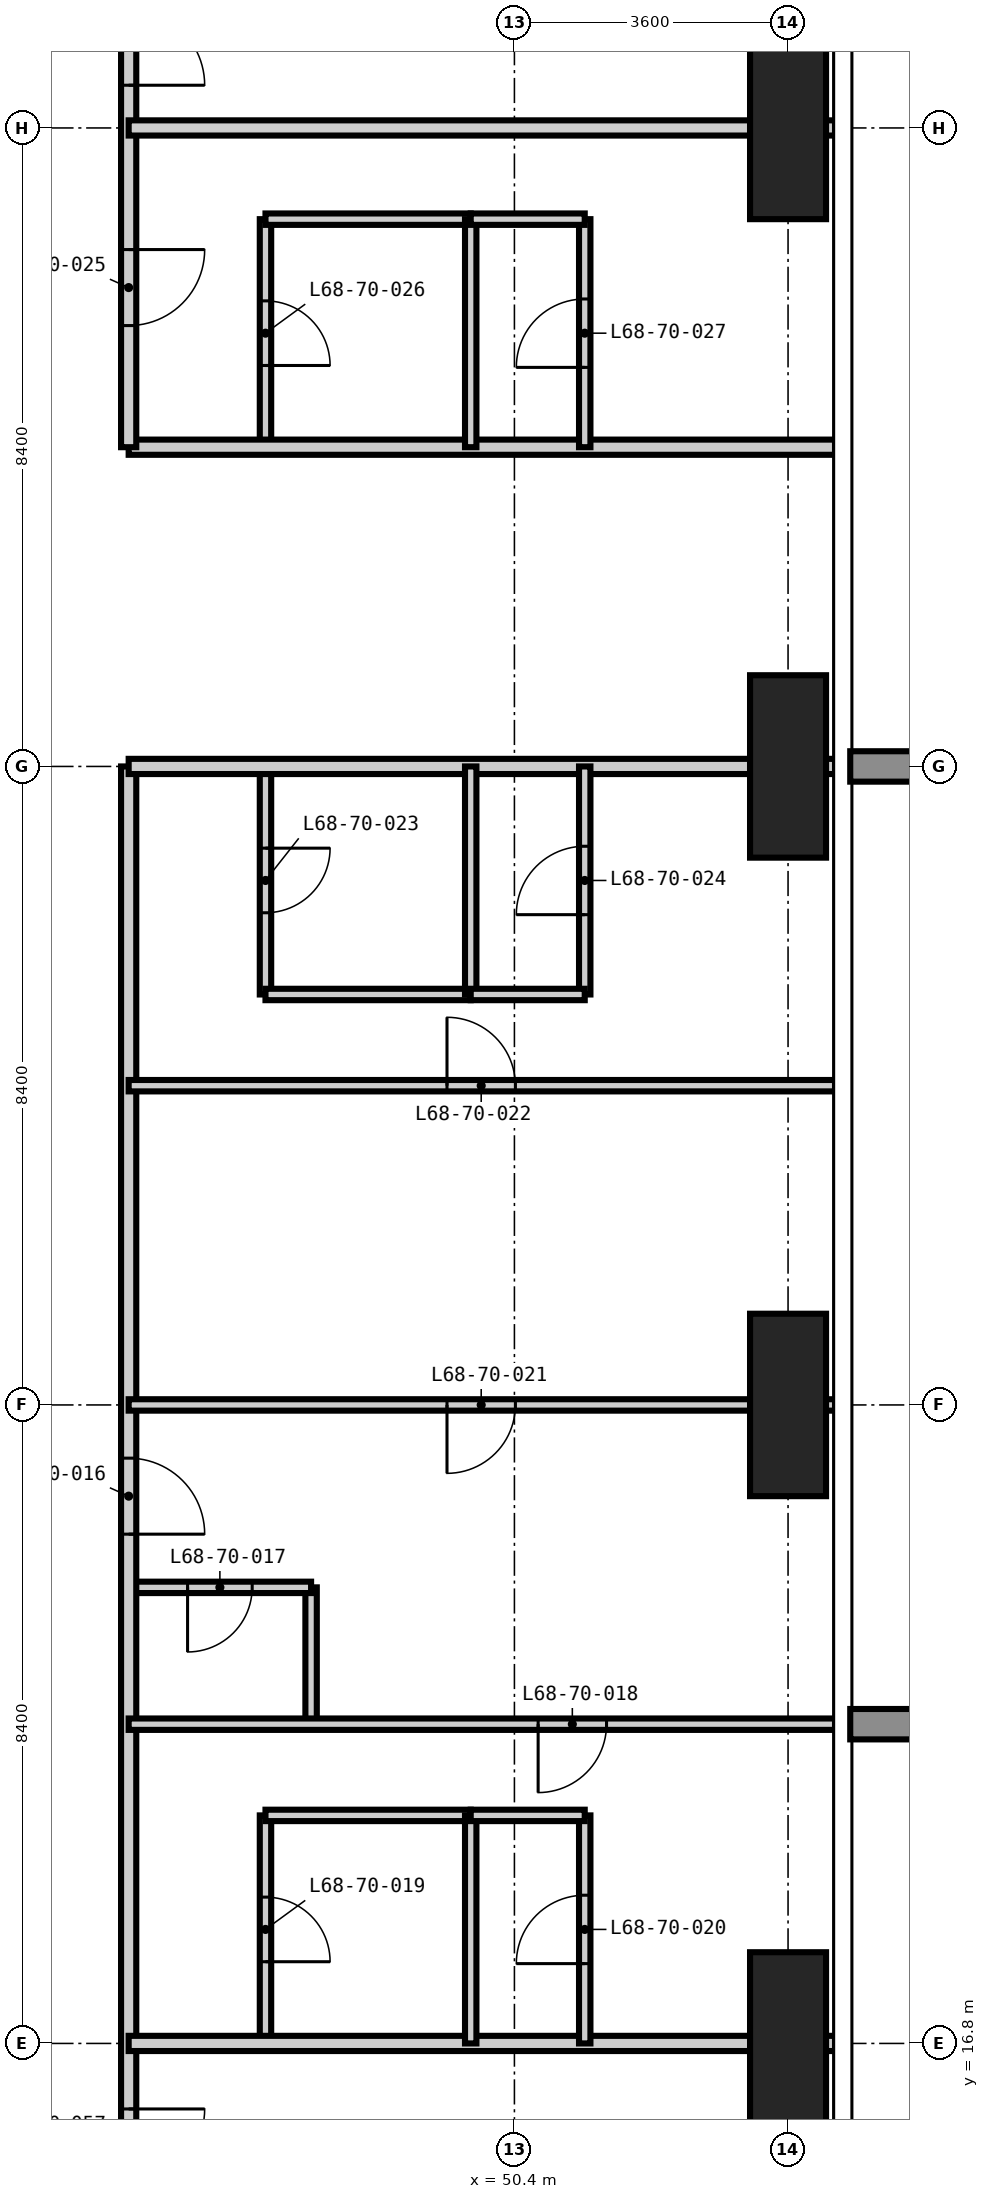
"""IFC4 building model, lengths in metres.
Left out: names, types, materials, properties, quantities, classifications, styles, units other than length and angle.
Written with IfcOpenShell. Run it as: python <this file> out.ifc"""

import sys

from ifc_helpers import new_model, si_unit, direction, frame, frame_2d, origin, origin_2d, place, context, subcontext, project, spatial, rectangle, extrude, element, fill, save


model = new_model("IFC4")
c1 = context("Model", 3, precision=1e-05, world=origin(), true_north=direction((0.0, 1.0)))
c2 = subcontext(c1, "Body", "Model", "MODEL_VIEW")
j1 = project(units=[si_unit("LENGTHUNIT", "METRE"), si_unit("PLANEANGLEUNIT", "RADIAN")], contexts=[c1])
p1 = place(None, origin())
s1 = spatial("IfcSite", under=j1, at=p1, CompositionType="ELEMENT")
p2 = place(p1, origin())
s2 = spatial("IfcBuilding", under=s1, at=p2, CompositionType="ELEMENT")
p3 = place(p2, frame((0.0, 0.0, 264.6)))
s3 = spatial("IfcBuildingStorey", under=s2, at=p3, CompositionType="ELEMENT", Elevation=264.6)
for number, where, z_axis, x_axis in (
    (1, (54.0, 16.8, -0.35), (0.0, 0.0, 1.0), (1.0, 0.0, 0.0)),
    (2, (54.0, 25.2, -0.35), (0.0, 0.0, 1.0), (1.0, 0.0, 0.0)),
    (3, (54.0, 33.6, -0.35), (0.0, 0.0, 1.0), (1.0, 0.0, 0.0)),
    (4, (54.0, 42.0, -0.35), (0.0, 0.0, 1.0), (1.0, 0.0, 0.0)),
):
    element("IfcColumn", number, at=place(p3, frame(where, z_axis=z_axis, x_axis=x_axis)), inside=s3, PredefinedType="COLUMN", context=c2, shape_type="SweptSolid", body=[
        extrude(rectangle(XDim=1.0, YDim=2.4, at=origin_2d()), origin(), (0.0, 0.0, 1.0), 3.9),
    ])
p4 = place(p3, frame((47.125, 16.8, 0.0), z_axis=(0.0, 0.0, 1.0), x_axis=(0.0, 1.0, 0.0)))
e5 = element("IfcWall", 5, at=p4, inside=s3, PredefinedType="PARTITIONING", context=c2, shape_type="SweptSolid", body=[
    extrude(rectangle(XDim=3.0, YDim=0.15, at=frame_2d((1.5, 0.0))), origin(), (0.0, 0.0, 1.0), 3.55),
])
p5 = place(p4, frame((1.075, 0.0, 0.0)))
e6 = element("IfcOpeningElement", 6, at=p5, cuts=e5, PredefinedType="OPENING", context=c2, shape_type="SweptSolid", body=[
    extrude(rectangle(XDim=0.85, YDim=2.1, at=frame_2d((0.425, 1.05))), frame((0.0, 0.085, 0.0), z_axis=(0.0, -1.0, 0.0), x_axis=(1.0, 0.0, 0.0)), (0.0, 0.0, 1.0), 0.17),
])
p6 = place(p3, frame((47.125, 30.6, 0.0), z_axis=(0.0, 0.0, 1.0), x_axis=(0.0, 1.0, 0.0)))
e7 = element("IfcWall", 7, at=p6, inside=s3, PredefinedType="PARTITIONING", context=c2, shape_type="SweptSolid", body=[
    extrude(rectangle(XDim=3.0, YDim=0.15, at=frame_2d((1.5, 0.0))), origin(), (0.0, 0.0, 1.0), 3.55),
])
p7 = place(p6, frame((1.075, 0.0, 0.0)))
e8 = element("IfcOpeningElement", 8, at=p7, cuts=e7, PredefinedType="OPENING", context=c2, shape_type="SweptSolid", body=[
    extrude(rectangle(XDim=0.85, YDim=2.1, at=frame_2d((0.425, 1.05))), frame((0.0, 0.085, 0.0), z_axis=(0.0, -1.0, 0.0), x_axis=(1.0, 0.0, 0.0)), (0.0, 0.0, 1.0), 0.17),
])
p8 = place(p3, frame((47.125, 37.8, 0.0), z_axis=(0.0, 0.0, 1.0), x_axis=(0.0, 1.0, 0.0)))
e9 = element("IfcWall", 9, at=p8, inside=s3, PredefinedType="PARTITIONING", context=c2, shape_type="SweptSolid", body=[
    extrude(rectangle(XDim=3.0, YDim=0.15, at=frame_2d((1.5, 0.0))), origin(), (0.0, 0.0, 1.0), 3.55),
])
p9 = place(p8, frame((1.075, 0.0, 0.0)))
e10 = element("IfcOpeningElement", 10, at=p9, cuts=e9, PredefinedType="OPENING", context=c2, shape_type="SweptSolid", body=[
    extrude(rectangle(XDim=0.85, YDim=2.1, at=frame_2d((0.425, 1.05))), frame((0.0, 0.085, 0.0), z_axis=(0.0, -1.0, 0.0), x_axis=(1.0, 0.0, 0.0)), (0.0, 0.0, 1.0), 0.17),
])
p10 = place(p3, frame((47.725, 21.0, 0.0), z_axis=(0.0, 0.0, 1.0), x_axis=(0.0, 1.0, 0.0)))
e11 = element("IfcWall", 11, at=p10, inside=s3, PredefinedType="PARTITIONING", context=c2, shape_type="SweptSolid", body=[
    extrude(rectangle(XDim=1.8, YDim=0.15, at=frame_2d((0.9, 0.0))), origin(), (0.0, 0.0, 1.0), 3.55),
])
p11 = place(p3, frame((47.125, 19.8, 0.0), z_axis=(0.0, 0.0, 1.0), x_axis=(1.0, 0.0, 0.0)))
e12 = element("IfcWall", 12, at=p11, inside=s3, PredefinedType="PARTITIONING", context=c2, shape_type="SweptSolid", body=[
    extrude(rectangle(XDim=2.7, YDim=0.15, at=frame_2d((1.35, 0.0))), origin(), (0.0, 0.0, 1.0), 3.55),
])
p12 = place(p3, frame((45.325, 22.8, 0.0), z_axis=(0.0, 0.0, 1.0), x_axis=(1.0, 0.0, 0.0)))
e13 = element("IfcWall", 13, at=p12, inside=s3, PredefinedType="PARTITIONING", context=c2, shape_type="SweptSolid", body=[
    extrude(rectangle(XDim=2.4, YDim=0.15, at=frame_2d((1.2, 0.0))), origin(), (0.0, 0.0, 1.0), 3.55),
])
p13 = place(p12, frame((0.775, 0.0, 0.0)))
e14 = element("IfcOpeningElement", 14, at=p13, cuts=e13, PredefinedType="OPENING", context=c2, shape_type="SweptSolid", body=[
    extrude(rectangle(XDim=0.85, YDim=2.1, at=frame_2d((0.425, 1.05))), frame((0.0, 0.085, 0.0), z_axis=(0.0, -1.0, 0.0), x_axis=(1.0, 0.0, 0.0)), (0.0, 0.0, 1.0), 0.17),
])
for number, where, z_axis, x_axis in (
    (15, (47.125, 30.6, 0.0), (0.0, 0.0, 1.0), (1.0, 0.0, 0.0)),
    (16, (47.125, 40.8, 0.0), (0.0, 0.0, 1.0), (1.0, 0.0, 0.0)),
):
    element("IfcWall", number, at=place(p3, frame(where, z_axis=z_axis, x_axis=x_axis)), inside=s3, PredefinedType="PARTITIONING", context=c2, shape_type="SweptSolid", body=[
        extrude(rectangle(XDim=2.7, YDim=0.15, at=frame_2d((1.35, 0.0))), origin(), (0.0, 0.0, 1.0), 3.55),
    ])
p14 = place(p3, frame((45.325, 37.8, 0.0), z_axis=(0.0, 0.0, 1.0), x_axis=(1.0, 0.0, 0.0)))
e17 = element("IfcWall", 17, at=p14, inside=s3, PredefinedType="PARTITIONING", context=c2, shape_type="SweptSolid", body=[
    extrude(rectangle(XDim=9.293, YDim=0.2, at=frame_2d((4.646, 0.0))), origin(), (0.0, 0.0, 1.0), 3.55),
])
p15 = place(p3, frame((45.325, 33.6, 0.0), z_axis=(0.0, 0.0, 1.0), x_axis=(0.0, -1.0, 0.0)))
e18 = element("IfcWall", 18, at=p15, inside=s3, PredefinedType="PARTITIONING", context=c2, shape_type="SweptSolid", body=[
    extrude(rectangle(XDim=19.525, YDim=0.2, at=frame_2d((9.763, 0.0))), origin(), (0.0, 0.0, 1.0), 3.55),
])
p16 = place(p15, frame((9.1, 0.0, 0.0)))
e19 = element("IfcOpeningElement", 19, at=p16, cuts=e18, PredefinedType="OPENING", context=c2, shape_type="SweptSolid", body=[
    extrude(rectangle(XDim=1.0, YDim=2.2, at=frame_2d((0.5, 1.1))), frame((0.0, 0.11, 0.0), z_axis=(0.0, -1.0, 0.0), x_axis=(1.0, 0.0, 0.0)), (0.0, 0.0, 1.0), 0.22),
])
p17 = place(p15, frame((17.662, 0.0, 0.0)))
e20 = element("IfcOpeningElement", 20, at=p17, cuts=e18, PredefinedType="OPENING", context=c2, shape_type="SweptSolid", body=[
    extrude(rectangle(XDim=1.0, YDim=2.2, at=frame_2d((0.5, 1.1))), frame((0.0, 0.11, 0.0), z_axis=(0.0, -1.0, 0.0), x_axis=(1.0, 0.0, 0.0)), (0.0, 0.0, 1.0), 0.22),
])
p18 = place(p3, frame((45.325, 44.125, 0.0), z_axis=(0.0, 0.0, 1.0), x_axis=(0.0, -1.0, 0.0)))
e21 = element("IfcWall", 21, at=p18, inside=s3, PredefinedType="PARTITIONING", context=c2, shape_type="SweptSolid", body=[
    extrude(rectangle(XDim=6.325, YDim=0.2, at=frame_2d((3.163, 0.0))), origin(), (0.0, 0.0, 1.0), 3.55),
])
p19 = place(p18, frame((3.725, 0.0, 0.0)))
e22 = element("IfcOpeningElement", 22, at=p19, cuts=e21, PredefinedType="OPENING", context=c2, shape_type="SweptSolid", body=[
    extrude(rectangle(XDim=1.0, YDim=2.2, at=frame_2d((0.5, 1.1))), frame((0.0, 0.11, 0.0), z_axis=(0.0, -1.0, 0.0), x_axis=(1.0, 0.0, 0.0)), (0.0, 0.0, 1.0), 0.22),
])
p20 = place(p18, frame((0.563, 0.0, 0.0)))
e23 = element("IfcOpeningElement", 23, at=p20, cuts=e21, PredefinedType="OPENING", context=c2, shape_type="SweptSolid", body=[
    extrude(rectangle(XDim=1.0, YDim=2.2, at=frame_2d((0.5, 1.1))), frame((0.0, 0.11, 0.0), z_axis=(0.0, -1.0, 0.0), x_axis=(1.0, 0.0, 0.0)), (0.0, 0.0, 1.0), 0.22),
])
for number, where, z_axis, x_axis in (
    (24, (54.618, 33.6, 0.0), (0.0, 0.0, 1.0), (-1.0, 0.0, 0.0)),
    (25, (45.325, 16.8, 0.0), (0.0, 0.0, 1.0), (1.0, 0.0, 0.0)),
    (26, (45.325, 42.0, 0.0), (0.0, 0.0, 1.0), (1.0, 0.0, 0.0)),
):
    element("IfcWall", number, at=place(p3, frame(where, z_axis=z_axis, x_axis=x_axis)), inside=s3, PredefinedType="PARTITIONING", context=c2, shape_type="SweptSolid", body=[
        extrude(rectangle(XDim=9.293, YDim=0.2, at=frame_2d((4.646, 0.0))), origin(), (0.0, 0.0, 1.0), 3.55),
    ])
for number, where, z_axis, x_axis in (
    (27, (49.825, 16.8, 0.0), (0.0, 0.0, 1.0), (0.0, 1.0, 0.0)),
    (28, (49.825, 30.6, 0.0), (0.0, 0.0, 1.0), (0.0, 1.0, 0.0)),
    (29, (49.825, 37.8, 0.0), (0.0, 0.0, 1.0), (0.0, 1.0, 0.0)),
):
    element("IfcWall", number, at=place(p3, frame(where, z_axis=z_axis, x_axis=x_axis)), inside=s3, PredefinedType="PARTITIONING", context=c2, shape_type="SweptSolid", body=[
        extrude(rectangle(XDim=3.0, YDim=0.15, at=frame_2d((1.5, 0.0))), origin(), (0.0, 0.0, 1.0), 3.55),
    ])
p21 = place(p3, frame((51.325, 16.8, 0.0), z_axis=(0.0, 0.0, 1.0), x_axis=(0.0, 1.0, 0.0)))
e30 = element("IfcWall", 30, at=p21, inside=s3, PredefinedType="PARTITIONING", context=c2, shape_type="SweptSolid", body=[
    extrude(rectangle(XDim=3.0, YDim=0.15, at=frame_2d((1.5, 0.0))), origin(), (0.0, 0.0, 1.0), 3.55),
])
p22 = place(p21, frame((1.05, 0.0, 0.0)))
e31 = element("IfcOpeningElement", 31, at=p22, cuts=e30, PredefinedType="OPENING", context=c2, shape_type="SweptSolid", body=[
    extrude(rectangle(XDim=0.9, YDim=2.1, at=frame_2d((0.45, 1.05))), frame((0.0, 0.085, 0.0), z_axis=(0.0, -1.0, 0.0), x_axis=(1.0, 0.0, 0.0)), (0.0, 0.0, 1.0), 0.17),
])
p23 = place(p3, frame((51.325, 30.6, 0.0), z_axis=(0.0, 0.0, 1.0), x_axis=(0.0, 1.0, 0.0)))
e32 = element("IfcWall", 32, at=p23, inside=s3, PredefinedType="PARTITIONING", context=c2, shape_type="SweptSolid", body=[
    extrude(rectangle(XDim=3.0, YDim=0.15, at=frame_2d((1.5, 0.0))), origin(), (0.0, 0.0, 1.0), 3.55),
])
p24 = place(p23, frame((1.05, 0.0, 0.0)))
e33 = element("IfcOpeningElement", 33, at=p24, cuts=e32, PredefinedType="OPENING", context=c2, shape_type="SweptSolid", body=[
    extrude(rectangle(XDim=0.9, YDim=2.1, at=frame_2d((0.45, 1.05))), frame((0.0, 0.085, 0.0), z_axis=(0.0, -1.0, 0.0), x_axis=(1.0, 0.0, 0.0)), (0.0, 0.0, 1.0), 0.17),
])
p25 = place(p3, frame((51.325, 37.8, 0.0), z_axis=(0.0, 0.0, 1.0), x_axis=(0.0, 1.0, 0.0)))
e34 = element("IfcWall", 34, at=p25, inside=s3, PredefinedType="PARTITIONING", context=c2, shape_type="SweptSolid", body=[
    extrude(rectangle(XDim=3.0, YDim=0.15, at=frame_2d((1.5, 0.0))), origin(), (0.0, 0.0, 1.0), 3.55),
])
p26 = place(p25, frame((1.05, 0.0, 0.0)))
e35 = element("IfcOpeningElement", 35, at=p26, cuts=e34, PredefinedType="OPENING", context=c2, shape_type="SweptSolid", body=[
    extrude(rectangle(XDim=0.9, YDim=2.1, at=frame_2d((0.45, 1.05))), frame((0.0, 0.085, 0.0), z_axis=(0.0, -1.0, 0.0), x_axis=(1.0, 0.0, 0.0)), (0.0, 0.0, 1.0), 0.17),
])
p27 = place(p3, frame((49.825, 19.8, 0.0), z_axis=(0.0, 0.0, 1.0), x_axis=(1.0, 0.0, 0.0)))
e36 = element("IfcWall", 36, at=p27, inside=s3, PredefinedType="PARTITIONING", context=c2, shape_type="SweptSolid", body=[
    extrude(rectangle(XDim=1.5, YDim=0.15, at=frame_2d((0.75, 0.0))), origin(), (0.0, 0.0, 1.0), 3.55),
])
p28 = place(p3, frame((45.325, 21.0, 0.0), z_axis=(0.0, 0.0, 1.0), x_axis=(1.0, 0.0, 0.0)))
e37 = element("IfcWall", 37, at=p28, inside=s3, PredefinedType="PARTITIONING", context=c2, shape_type="SweptSolid", body=[
    extrude(rectangle(XDim=9.293, YDim=0.15, at=frame_2d((4.646, 0.0))), origin(), (0.0, 0.0, 1.0), 3.55),
])
p29 = place(p28, frame((5.387, 0.0, 0.0)))
e38 = element("IfcOpeningElement", 38, at=p29, cuts=e37, PredefinedType="OPENING", context=c2, shape_type="SweptSolid", body=[
    extrude(rectangle(XDim=0.9, YDim=2.1, at=frame_2d((0.45, 1.05))), frame((0.0, 0.085, 0.0), z_axis=(0.0, -1.0, 0.0), x_axis=(1.0, 0.0, 0.0)), (0.0, 0.0, 1.0), 0.17),
])
p30 = place(p3, frame((45.325, 25.2, 0.0), z_axis=(0.0, 0.0, 1.0), x_axis=(1.0, 0.0, 0.0)))
e39 = element("IfcWall", 39, at=p30, inside=s3, PredefinedType="PARTITIONING", context=c2, shape_type="SweptSolid", body=[
    extrude(rectangle(XDim=9.293, YDim=0.15, at=frame_2d((4.646, 0.0))), origin(), (0.0, 0.0, 1.0), 3.55),
])
p31 = place(p30, frame((4.188, 0.0, 0.0)))
e40 = element("IfcOpeningElement", 40, at=p31, cuts=e39, PredefinedType="OPENING", context=c2, shape_type="SweptSolid", body=[
    extrude(rectangle(XDim=0.9, YDim=2.1, at=frame_2d((0.45, 1.05))), frame((0.0, 0.085, 0.0), z_axis=(0.0, -1.0, 0.0), x_axis=(1.0, 0.0, 0.0)), (0.0, 0.0, 1.0), 0.17),
])
p32 = place(p3, frame((45.325, 29.4, 0.0), z_axis=(0.0, 0.0, 1.0), x_axis=(1.0, 0.0, 0.0)))
e41 = element("IfcWall", 41, at=p32, inside=s3, PredefinedType="PARTITIONING", context=c2, shape_type="SweptSolid", body=[
    extrude(rectangle(XDim=9.293, YDim=0.15, at=frame_2d((4.646, 0.0))), origin(), (0.0, 0.0, 1.0), 3.55),
])
p33 = place(p32, frame((4.188, 0.0, 0.0)))
e42 = element("IfcOpeningElement", 42, at=p33, cuts=e41, PredefinedType="OPENING", context=c2, shape_type="SweptSolid", body=[
    extrude(rectangle(XDim=0.9, YDim=2.1, at=frame_2d((0.45, 1.05))), frame((0.0, 0.085, 0.0), z_axis=(0.0, -1.0, 0.0), x_axis=(1.0, 0.0, 0.0)), (0.0, 0.0, 1.0), 0.17),
])
for number, where, z_axis, x_axis in (
    (43, (49.825, 30.6, 0.0), (0.0, 0.0, 1.0), (1.0, 0.0, 0.0)),
    (44, (49.825, 40.8, 0.0), (0.0, 0.0, 1.0), (1.0, 0.0, 0.0)),
):
    element("IfcWall", number, at=place(p3, frame(where, z_axis=z_axis, x_axis=x_axis)), inside=s3, PredefinedType="PARTITIONING", context=c2, shape_type="SweptSolid", body=[
        extrude(rectangle(XDim=1.5, YDim=0.15, at=frame_2d((0.75, 0.0))), origin(), (0.0, 0.0, 1.0), 3.55),
    ])
p34 = place(p16, origin())
e45 = element("IfcDoor", 45, at=p34, inside=s3, OperationType="SINGLE_SWING_RIGHT", PredefinedType="DOOR", context=c2, shape_type="SweptSolid", body=[
    extrude(rectangle(XDim=1.0, YDim=2.2, at=frame_2d((0.5, 1.1))), frame((0.0, 0.025, 0.0), z_axis=(0.0, -1.0, 0.0), x_axis=(1.0, 0.0, 0.0)), (0.0, 0.0, 1.0), 0.05),
])
fill(e19, e45)
p35 = place(p13, frame((0.85, 0.0, 0.0), z_axis=(0.0, 0.0, 1.0), x_axis=(-1.0, 0.0, 0.0)))
e46 = element("IfcDoor", 46, at=p35, inside=s3, OperationType="SINGLE_SWING_RIGHT", PredefinedType="DOOR", context=c2, shape_type="SweptSolid", body=[
    extrude(rectangle(XDim=0.85, YDim=2.1, at=frame_2d((0.425, 1.05))), frame((0.0, 0.025, 0.0), z_axis=(0.0, -1.0, 0.0), x_axis=(1.0, 0.0, 0.0)), (0.0, 0.0, 1.0), 0.05),
])
fill(e14, e46)
p36 = place(p29, frame((0.9, 0.0, 0.0), z_axis=(0.0, 0.0, 1.0), x_axis=(-1.0, 0.0, 0.0)))
e47 = element("IfcDoor", 47, at=p36, inside=s3, OperationType="SINGLE_SWING_RIGHT", PredefinedType="DOOR", context=c2, shape_type="SweptSolid", body=[
    extrude(rectangle(XDim=0.9, YDim=2.1, at=frame_2d((0.45, 1.05))), frame((0.0, 0.025, 0.0), z_axis=(0.0, -1.0, 0.0), x_axis=(1.0, 0.0, 0.0)), (0.0, 0.0, 1.0), 0.05),
])
fill(e38, e47)
p37 = place(p5, frame((0.85, 0.0, 0.0), z_axis=(0.0, 0.0, 1.0), x_axis=(-1.0, 0.0, 0.0)))
e48 = element("IfcDoor", 48, at=p37, inside=s3, OperationType="SINGLE_SWING_RIGHT", PredefinedType="DOOR", context=c2, shape_type="SweptSolid", body=[
    extrude(rectangle(XDim=0.85, YDim=2.1, at=frame_2d((0.425, 1.05))), frame((0.0, 0.025, 0.0), z_axis=(0.0, -1.0, 0.0), x_axis=(1.0, 0.0, 0.0)), (0.0, 0.0, 1.0), 0.05),
])
fill(e6, e48)
p38 = place(p22, origin())
e49 = element("IfcDoor", 49, at=p38, inside=s3, OperationType="SINGLE_SWING_LEFT", PredefinedType="DOOR", context=c2, shape_type="SweptSolid", body=[
    extrude(rectangle(XDim=0.9, YDim=2.1, at=frame_2d((0.45, 1.05))), frame((0.0, 0.025, 0.0), z_axis=(0.0, -1.0, 0.0), x_axis=(1.0, 0.0, 0.0)), (0.0, 0.0, 1.0), 0.05),
])
fill(e31, e49)
p39 = place(p31, frame((0.9, 0.0, 0.0), z_axis=(0.0, 0.0, 1.0), x_axis=(-1.0, 0.0, 0.0)))
e50 = element("IfcDoor", 50, at=p39, inside=s3, OperationType="SINGLE_SWING_RIGHT", PredefinedType="DOOR", context=c2, shape_type="SweptSolid", body=[
    extrude(rectangle(XDim=0.9, YDim=2.1, at=frame_2d((0.45, 1.05))), frame((0.0, 0.025, 0.0), z_axis=(0.0, -1.0, 0.0), x_axis=(1.0, 0.0, 0.0)), (0.0, 0.0, 1.0), 0.05),
])
fill(e40, e50)
p40 = place(p33, origin())
e51 = element("IfcDoor", 51, at=p40, inside=s3, OperationType="SINGLE_SWING_LEFT", PredefinedType="DOOR", context=c2, shape_type="SweptSolid", body=[
    extrude(rectangle(XDim=0.9, YDim=2.1, at=frame_2d((0.45, 1.05))), frame((0.0, 0.025, 0.0), z_axis=(0.0, -1.0, 0.0), x_axis=(1.0, 0.0, 0.0)), (0.0, 0.0, 1.0), 0.05),
])
fill(e42, e51)
p41 = place(p7, frame((0.85, 0.0, 0.0), z_axis=(0.0, 0.0, 1.0), x_axis=(-1.0, 0.0, 0.0)))
e52 = element("IfcDoor", 52, at=p41, inside=s3, OperationType="SINGLE_SWING_LEFT", PredefinedType="DOOR", context=c2, shape_type="SweptSolid", body=[
    extrude(rectangle(XDim=0.85, YDim=2.1, at=frame_2d((0.425, 1.05))), frame((0.0, 0.025, 0.0), z_axis=(0.0, -1.0, 0.0), x_axis=(1.0, 0.0, 0.0)), (0.0, 0.0, 1.0), 0.05),
])
fill(e8, e52)
p42 = place(p24, origin())
e53 = element("IfcDoor", 53, at=p42, inside=s3, OperationType="SINGLE_SWING_LEFT", PredefinedType="DOOR", context=c2, shape_type="SweptSolid", body=[
    extrude(rectangle(XDim=0.9, YDim=2.1, at=frame_2d((0.45, 1.05))), frame((0.0, 0.025, 0.0), z_axis=(0.0, -1.0, 0.0), x_axis=(1.0, 0.0, 0.0)), (0.0, 0.0, 1.0), 0.05),
])
fill(e33, e53)
p43 = place(p19, origin())
e54 = element("IfcDoor", 54, at=p43, inside=s3, OperationType="SINGLE_SWING_LEFT", PredefinedType="DOOR", context=c2, shape_type="SweptSolid", body=[
    extrude(rectangle(XDim=1.0, YDim=2.2, at=frame_2d((0.5, 1.1))), frame((0.0, 0.025, 0.0), z_axis=(0.0, -1.0, 0.0), x_axis=(1.0, 0.0, 0.0)), (0.0, 0.0, 1.0), 0.05),
])
fill(e22, e54)
p44 = place(p9, frame((0.85, 0.0, 0.0), z_axis=(0.0, 0.0, 1.0), x_axis=(-1.0, 0.0, 0.0)))
e55 = element("IfcDoor", 55, at=p44, inside=s3, OperationType="SINGLE_SWING_RIGHT", PredefinedType="DOOR", context=c2, shape_type="SweptSolid", body=[
    extrude(rectangle(XDim=0.85, YDim=2.1, at=frame_2d((0.425, 1.05))), frame((0.0, 0.025, 0.0), z_axis=(0.0, -1.0, 0.0), x_axis=(1.0, 0.0, 0.0)), (0.0, 0.0, 1.0), 0.05),
])
fill(e10, e55)
p45 = place(p26, origin())
e56 = element("IfcDoor", 56, at=p45, inside=s3, OperationType="SINGLE_SWING_LEFT", PredefinedType="DOOR", context=c2, shape_type="SweptSolid", body=[
    extrude(rectangle(XDim=0.9, YDim=2.1, at=frame_2d((0.45, 1.05))), frame((0.0, 0.025, 0.0), z_axis=(0.0, -1.0, 0.0), x_axis=(1.0, 0.0, 0.0)), (0.0, 0.0, 1.0), 0.05),
])
fill(e35, e56)
p46 = place(p17, origin())
e57 = element("IfcDoor", 57, at=p46, inside=s3, OperationType="SINGLE_SWING_LEFT", PredefinedType="DOOR", context=c2, shape_type="SweptSolid", body=[
    extrude(rectangle(XDim=1.0, YDim=2.2, at=frame_2d((0.5, 1.1))), frame((0.0, 0.025, 0.0), z_axis=(0.0, -1.0, 0.0), x_axis=(1.0, 0.0, 0.0)), (0.0, 0.0, 1.0), 0.05),
])
fill(e20, e57)
p47 = place(p20, origin())
e58 = element("IfcDoor", 58, at=p47, inside=s3, OperationType="SINGLE_SWING_RIGHT", PredefinedType="DOOR", context=c2, shape_type="SweptSolid", body=[
    extrude(rectangle(XDim=1.0, YDim=2.2, at=frame_2d((0.5, 1.1))), frame((0.0, 0.025, 0.0), z_axis=(0.0, -1.0, 0.0), x_axis=(1.0, 0.0, 0.0)), (0.0, 0.0, 1.0), 0.05),
])
fill(e23, e58)
save(model, sys.argv[1])
